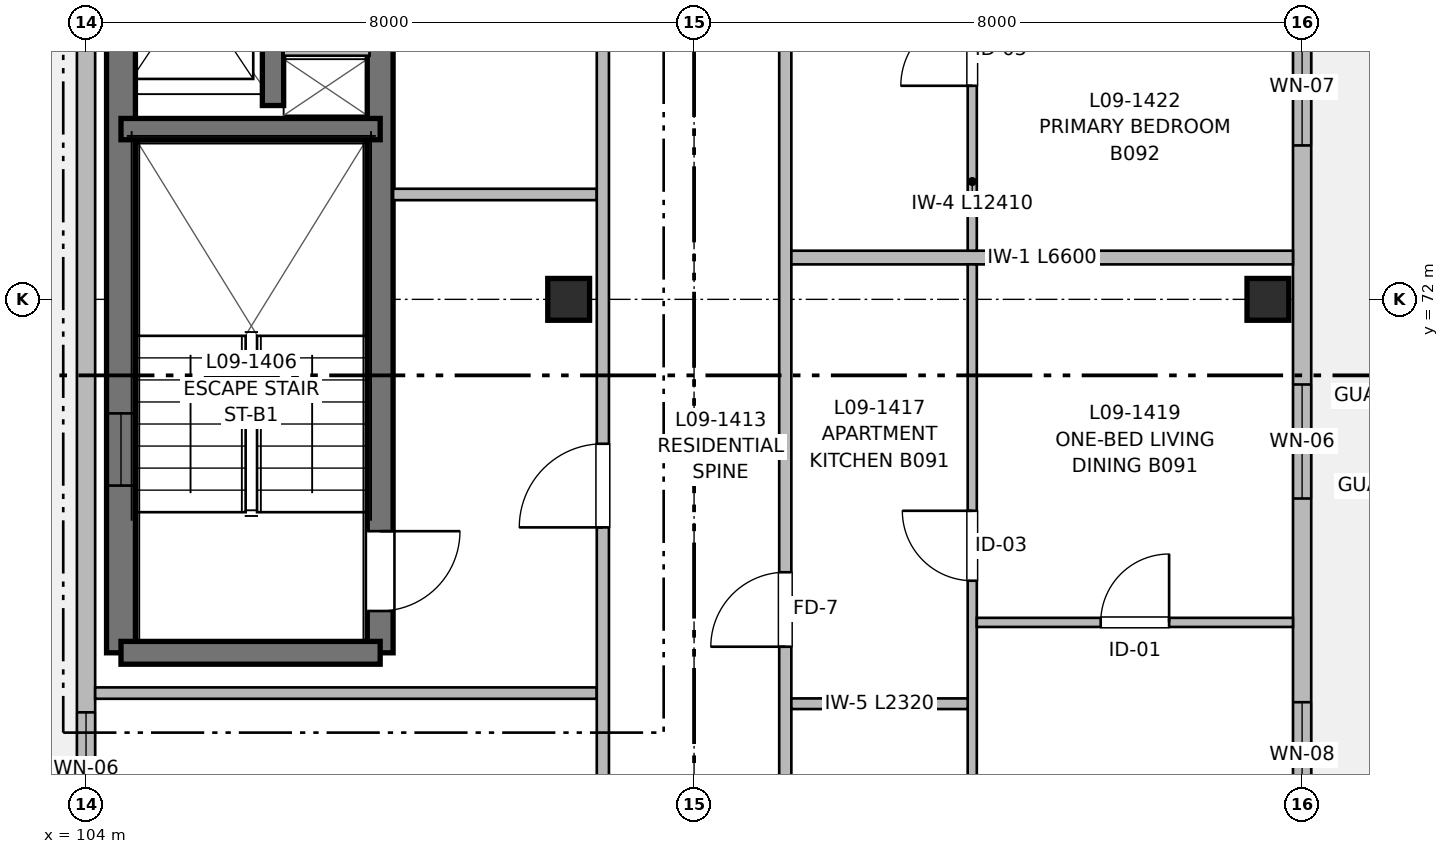
"""IFC4 building model, lengths in metres.
Left out: names, types, materials, properties, quantities, classifications, styles, units other than length and angle.
Written with IfcOpenShell. Run it as: python <this file> out.ifc"""

import sys

from ifc_helpers import new_model, si_unit, direction, frame, frame_2d, origin, origin_2d, place, context, subcontext, project, spatial, rectangle, extrude, element, fill, save


model = new_model("IFC4")
c1 = context("Model", 3, precision=1e-05, world=origin(), true_north=direction((0.0, 1.0)))
c2 = subcontext(c1, "Body", "Model", "MODEL_VIEW")
j1 = project(units=[si_unit("LENGTHUNIT", "METRE"), si_unit("PLANEANGLEUNIT", "RADIAN")], contexts=[c1])
p1 = place(None, origin())
s1 = spatial("IfcSite", under=j1, at=p1, CompositionType="ELEMENT")
p2 = place(p1, origin())
s2 = spatial("IfcBuilding", under=s1, at=p2, CompositionType="ELEMENT")
p3 = place(p2, frame((0.0, 0.0, 29.76)))
s3 = spatial("IfcBuildingStorey", under=s2, at=p3, CompositionType="ELEMENT", Elevation=29.76)
for number, where, z_axis, x_axis in (
    (1, (110.35, 72.0, 0.0), (0.0, 0.0, 1.0), (1.0, 0.0, 0.0)),
    (2, (119.55, 72.0, 0.0), (0.0, 0.0, 1.0), (1.0, 0.0, 0.0)),
):
    element("IfcColumn", number, at=place(p3, frame(where, z_axis=z_axis, x_axis=x_axis)), inside=s3, PredefinedType="COLUMN", context=c2, shape_type="SweptSolid", body=[
        extrude(rectangle(XDim=0.55, YDim=0.55, at=origin_2d()), origin(), (0.0, 0.0, 1.0), 3.2),
    ])
p4 = place(p3, frame((104.46, 67.35, 0.0), z_axis=(0.0, 0.0, 1.0), x_axis=(0.0, 1.0, 0.0)))
e3 = element("IfcWall", 3, at=p4, inside=s3, PredefinedType="SHEAR", context=c2, shape_type="SweptSolid", body=[
    extrude(rectangle(XDim=12.45, YDim=0.38, at=frame_2d((6.225, 0.0))), origin(), (0.0, 0.0, 1.0), 3.2),
])
p5 = place(p4, frame((2.2, 0.0, 0.97)))
e4 = element("IfcOpeningElement", 4, at=p5, cuts=e3, PredefinedType="OPENING", context=c2, shape_type="SweptSolid", body=[
    extrude(rectangle(XDim=0.95, YDim=1.25, at=frame_2d((0.475, 0.625))), frame((0.0, 0.2, 0.0), z_axis=(0.0, -1.0, 0.0), x_axis=(1.0, 0.0, 0.0)), (0.0, 0.0, 1.0), 0.4),
])
p6 = place(p3, frame((107.87, 79.8, 0.0), z_axis=(0.0, 0.0, 1.0), x_axis=(0.0, -1.0, 0.0)))
e5 = element("IfcWall", 5, at=p6, inside=s3, PredefinedType="SHEAR", context=c2, shape_type="SweptSolid", body=[
    extrude(rectangle(XDim=12.45, YDim=0.34, at=frame_2d((6.225, 0.0))), origin(), (0.0, 0.0, 1.0), 3.2),
])
p7 = place(p6, frame((10.85, 0.0, 0.0)))
e6 = element("IfcOpeningElement", 6, at=p7, cuts=e5, PredefinedType="OPENING", context=c2, shape_type="SweptSolid", body=[
    extrude(rectangle(XDim=1.05, YDim=2.15, at=frame_2d((0.525, 1.075))), frame((0.0, 0.18, 0.0), z_axis=(0.0, -1.0, 0.0), x_axis=(1.0, 0.0, 0.0)), (0.0, 0.0, 1.0), 0.36),
])
p8 = place(p3, frame((107.87, 67.35, 0.0), z_axis=(0.0, 0.0, 1.0), x_axis=(-1.0, 0.0, 0.0)))
e7 = element("IfcWall", 7, at=p8, inside=s3, PredefinedType="SHEAR", context=c2, shape_type="SweptSolid", body=[
    extrude(rectangle(XDim=3.41, YDim=0.3, at=frame_2d((1.705, 0.0))), origin(), (0.0, 0.0, 1.0), 3.2),
])
p9 = place(p3, frame((104.46, 74.24, 0.0), z_axis=(0.0, 0.0, 1.0), x_axis=(1.0, 0.0, 0.0)))
e8 = element("IfcWall", 8, at=p9, inside=s3, PredefinedType="SHEAR", context=c2, shape_type="SweptSolid", body=[
    extrude(rectangle(XDim=3.41, YDim=0.28, at=frame_2d((1.705, 0.0))), origin(), (0.0, 0.0, 1.0), 3.2),
])
p10 = place(p3, frame((106.46, 74.55, 0.0), z_axis=(0.0, 0.0, 1.0), x_axis=(0.0, 1.0, 0.0)))
e9 = element("IfcWall", 9, at=p10, inside=s3, PredefinedType="SHEAR", context=c2, shape_type="SweptSolid", body=[
    extrude(rectangle(XDim=5.25, YDim=0.28, at=frame_2d((2.625, 0.0))), origin(), (0.0, 0.0, 1.0), 3.2),
])
p11 = place(p10, frame((1.15, 0.0, 0.0)))
e10 = element("IfcOpeningElement", 10, at=p11, cuts=e9, PredefinedType="OPENING", context=c2, shape_type="SweptSolid", body=[
    extrude(rectangle(XDim=1.0, YDim=2.15, at=frame_2d((0.5, 1.075))), frame((0.0, 0.15, 0.0), z_axis=(0.0, -1.0, 0.0), x_axis=(1.0, 0.0, 0.0)), (0.0, 0.0, 1.0), 0.3),
])
p12 = place(p10, frame((3.85, 0.0, 0.0)))
e11 = element("IfcOpeningElement", 11, at=p12, cuts=e9, PredefinedType="OPENING", context=c2, shape_type="SweptSolid", body=[
    extrude(rectangle(XDim=0.9, YDim=2.15, at=frame_2d((0.45, 1.075))), frame((0.0, 0.15, 0.0), z_axis=(0.0, -1.0, 0.0), x_axis=(1.0, 0.0, 0.0)), (0.0, 0.0, 1.0), 0.3),
])
p13 = place(p3, frame((106.6, 75.28, 0.0), z_axis=(0.0, 0.0, 1.0), x_axis=(1.0, 0.0, 0.0)))
e12 = element("IfcWall", 12, at=p13, inside=s3, PredefinedType="PARTITIONING", context=c2, shape_type="SweptSolid", body=[
    extrude(rectangle(XDim=1.13, YDim=0.15, at=frame_2d((0.565, 0.0))), origin(), (0.0, 0.0, 1.0), 2.95),
])
p14 = place(p3, frame((120.0, 88.0, 0.0), z_axis=(0.0, 0.0, 1.0), x_axis=(0.0, -1.0, 0.0)))
e13 = element("IfcWall", 13, at=p14, inside=s3, PredefinedType="SOLIDWALL", context=c2, shape_type="SweptSolid", body=[
    extrude(rectangle(XDim=26.4, YDim=0.24, at=frame_2d((13.2, 0.0))), origin(), (0.0, 0.0, 1.0), 2.98),
])
p15 = place(p14, frame((3.8, 0.0, 0.0)))
e14 = element("IfcOpeningElement", 14, at=p15, cuts=e13, PredefinedType="OPENING", context=c2, shape_type="SweptSolid", body=[
    extrude(rectangle(XDim=1.2, YDim=2.2, at=frame_2d((0.6, 1.1))), frame((0.0, 0.13, 0.0), z_axis=(0.0, -1.0, 0.0), x_axis=(1.0, 0.0, 0.0)), (0.0, 0.0, 1.0), 0.26),
])
p16 = place(p14, frame((8.7, 0.0, 0.57)))
e15 = element("IfcOpeningElement", 15, at=p16, cuts=e13, PredefinedType="OPENING", context=c2, shape_type="SweptSolid", body=[
    extrude(rectangle(XDim=2.3, YDim=1.65, at=frame_2d((1.15, 0.825))), frame((0.0, 0.13, 0.0), z_axis=(0.0, -1.0, 0.0), x_axis=(1.0, 0.0, 0.0)), (0.0, 0.0, 1.0), 0.26),
])
p17 = place(p14, frame((12.425, 0.0, 0.82)))
e16 = element("IfcOpeningElement", 16, at=p17, cuts=e13, PredefinedType="OPENING", context=c2, shape_type="SweptSolid", body=[
    extrude(rectangle(XDim=1.55, YDim=1.4, at=frame_2d((0.775, 0.7))), frame((0.0, 0.13, 0.0), z_axis=(0.0, -1.0, 0.0), x_axis=(1.0, 0.0, 0.0)), (0.0, 0.0, 1.0), 0.26),
])
p18 = place(p14, frame((21.3, 0.0, 0.87)))
e17 = element("IfcOpeningElement", 17, at=p18, cuts=e13, PredefinedType="OPENING", context=c2, shape_type="SweptSolid", body=[
    extrude(rectangle(XDim=1.4, YDim=1.35, at=frame_2d((0.7, 0.675))), frame((0.0, 0.13, 0.0), z_axis=(0.0, -1.0, 0.0), x_axis=(1.0, 0.0, 0.0)), (0.0, 0.0, 1.0), 0.26),
])
p19 = place(p14, frame((17.12, 0.0, 0.82)))
e18 = element("IfcOpeningElement", 18, at=p19, cuts=e13, PredefinedType="OPENING", context=c2, shape_type="SweptSolid", body=[
    extrude(rectangle(XDim=1.5, YDim=1.4, at=frame_2d((0.75, 0.7))), frame((0.0, 0.13, 0.0), z_axis=(0.0, -1.0, 0.0), x_axis=(1.0, 0.0, 0.0)), (0.0, 0.0, 1.0), 0.26),
])
p20 = place(p14, frame((0.725, 0.0, 0.82)))
e19 = element("IfcOpeningElement", 19, at=p20, cuts=e13, PredefinedType="OPENING", context=c2, shape_type="SweptSolid", body=[
    extrude(rectangle(XDim=1.5, YDim=1.4, at=frame_2d((0.75, 0.7))), frame((0.0, 0.13, 0.0), z_axis=(0.0, -1.0, 0.0), x_axis=(1.0, 0.0, 0.0)), (0.0, 0.0, 1.0), 0.26),
])
p21 = place(p3, frame((104.0, 61.6, 0.0), z_axis=(0.0, 0.0, 1.0), x_axis=(0.0, 1.0, 0.0)))
e20 = element("IfcWall", 20, at=p21, inside=s3, PredefinedType="SOLIDWALL", context=c2, shape_type="SweptSolid", body=[
    extrude(rectangle(XDim=30.4, YDim=0.24, at=frame_2d((15.2, 0.0))), origin(), (0.0, 0.0, 1.0), 2.98),
])
p22 = place(p21, frame((3.467, 0.0, 0.82)))
e21 = element("IfcOpeningElement", 21, at=p22, cuts=e20, PredefinedType="OPENING", context=c2, shape_type="SweptSolid", body=[
    extrude(rectangle(XDim=1.5, YDim=1.4, at=frame_2d((0.75, 0.7))), frame((0.0, 0.13, 0.0), z_axis=(0.0, -1.0, 0.0), x_axis=(1.0, 0.0, 0.0)), (0.0, 0.0, 1.0), 0.26),
])
p23 = place(p21, frame((14.425, 0.0, 0.82)))
e22 = element("IfcOpeningElement", 22, at=p23, cuts=e20, PredefinedType="OPENING", context=c2, shape_type="SweptSolid", body=[
    extrude(rectangle(XDim=1.55, YDim=1.4, at=frame_2d((0.775, 0.7))), frame((0.0, 0.13, 0.0), z_axis=(0.0, -1.0, 0.0), x_axis=(1.0, 0.0, 0.0)), (0.0, 0.0, 1.0), 0.26),
])
p24 = place(p21, frame((24.333, 0.0, 0.0)))
e23 = element("IfcOpeningElement", 23, at=p24, cuts=e20, PredefinedType="OPENING", context=c2, shape_type="SweptSolid", body=[
    extrude(rectangle(XDim=1.2, YDim=2.2, at=frame_2d((0.6, 1.1))), frame((0.0, 0.13, 0.0), z_axis=(0.0, -1.0, 0.0), x_axis=(1.0, 0.0, 0.0)), (0.0, 0.0, 1.0), 0.26),
])
p25 = place(p21, frame((26.633, 0.0, 0.72)))
e24 = element("IfcOpeningElement", 24, at=p25, cuts=e20, PredefinedType="OPENING", context=c2, shape_type="SweptSolid", body=[
    extrude(rectangle(XDim=1.95, YDim=1.5, at=frame_2d((0.975, 0.75))), frame((0.0, 0.13, 0.0), z_axis=(0.0, -1.0, 0.0), x_axis=(1.0, 0.0, 0.0)), (0.0, 0.0, 1.0), 0.26),
])
p26 = place(p3, frame((104.12, 66.82, 0.0), z_axis=(0.0, 0.0, 1.0), x_axis=(1.0, 0.0, 0.0)))
e25 = element("IfcWall", 25, at=p26, inside=s3, PredefinedType="PARTITIONING", context=c2, shape_type="SweptSolid", body=[
    extrude(rectangle(XDim=6.6, YDim=0.15, at=frame_2d((3.3, 0.0))), origin(), (0.0, 0.0, 1.0), 2.935),
])
p27 = place(p3, frame((108.04, 73.38, 0.0), z_axis=(0.0, 0.0, 1.0), x_axis=(1.0, 0.0, 0.0)))
e26 = element("IfcWall", 26, at=p27, inside=s3, PredefinedType="PARTITIONING", context=c2, shape_type="SweptSolid", body=[
    extrude(rectangle(XDim=2.68, YDim=0.15, at=frame_2d((1.34, 0.0))), origin(), (0.0, 0.0, 1.0), 2.935),
])
p28 = place(p3, frame((110.8, 61.76, 0.0), z_axis=(0.0, 0.0, 1.0), x_axis=(0.0, 1.0, 0.0)))
e27 = element("IfcWall", 27, at=p28, inside=s3, PredefinedType="PARTITIONING", context=c2, shape_type="SweptSolid", body=[
    extrude(rectangle(XDim=45.04, YDim=0.16, at=frame_2d((22.52, 0.0))), origin(), (0.0, 0.0, 1.0), 2.935),
])
p29 = place(p28, frame((7.24, 0.0, 0.0)))
e28 = element("IfcOpeningElement", 28, at=p29, cuts=e27, PredefinedType="OPENING", context=c2, shape_type="SweptSolid", body=[
    extrude(rectangle(XDim=1.1, YDim=2.15, at=frame_2d((0.55, 1.075))), frame((0.0, 0.09, 0.0), z_axis=(0.0, -1.0, 0.0), x_axis=(1.0, 0.0, 0.0)), (0.0, 0.0, 1.0), 0.18),
])
p30 = place(p28, frame((13.64, 0.0, 0.0)))
e29 = element("IfcOpeningElement", 29, at=p30, cuts=e27, PredefinedType="OPENING", context=c2, shape_type="SweptSolid", body=[
    extrude(rectangle(XDim=1.6, YDim=2.15, at=frame_2d((0.8, 1.075))), frame((0.0, 0.09, 0.0), z_axis=(0.0, -1.0, 0.0), x_axis=(1.0, 0.0, 0.0)), (0.0, 0.0, 1.0), 0.18),
])
p31 = place(p28, frame((3.0, 0.0, 0.0)))
e30 = element("IfcOpeningElement", 30, at=p31, cuts=e27, PredefinedType="OPENING", context=c2, shape_type="SweptSolid", body=[
    extrude(rectangle(XDim=0.96, YDim=2.15, at=frame_2d((0.48, 1.075))), frame((0.0, 0.09, 0.0), z_axis=(0.0, -1.0, 0.0), x_axis=(1.0, 0.0, 0.0)), (0.0, 0.0, 1.0), 0.18),
])
p32 = place(p28, frame((27.245, 0.0, 0.0)))
e31 = element("IfcOpeningElement", 31, at=p32, cuts=e27, PredefinedType="OPENING", context=c2, shape_type="SweptSolid", body=[
    extrude(rectangle(XDim=0.98, YDim=2.15, at=frame_2d((0.49, 1.075))), frame((0.0, 0.09, 0.0), z_axis=(0.0, -1.0, 0.0), x_axis=(1.0, 0.0, 0.0)), (0.0, 0.0, 1.0), 0.18),
])
p33 = place(p28, frame((35.055, 0.0, 0.0)))
e32 = element("IfcOpeningElement", 32, at=p33, cuts=e27, PredefinedType="OPENING", context=c2, shape_type="SweptSolid", body=[
    extrude(rectangle(XDim=0.98, YDim=2.15, at=frame_2d((0.49, 1.075))), frame((0.0, 0.09, 0.0), z_axis=(0.0, -1.0, 0.0), x_axis=(1.0, 0.0, 0.0)), (0.0, 0.0, 1.0), 0.18),
])
p34 = place(p3, frame((113.2, 61.76, 0.0), z_axis=(0.0, 0.0, 1.0), x_axis=(0.0, 1.0, 0.0)))
e33 = element("IfcWall", 33, at=p34, inside=s3, PredefinedType="PARTITIONING", context=c2, shape_type="SweptSolid", body=[
    extrude(rectangle(XDim=45.04, YDim=0.16, at=frame_2d((22.52, 0.0))), origin(), (0.0, 0.0, 1.0), 2.935),
])
p35 = place(p34, frame((5.67, 0.0, 0.0)))
e34 = element("IfcOpeningElement", 34, at=p35, cuts=e33, PredefinedType="OPENING", context=c2, shape_type="SweptSolid", body=[
    extrude(rectangle(XDim=0.98, YDim=2.15, at=frame_2d((0.49, 1.075))), frame((0.0, 0.09, 0.0), z_axis=(0.0, -1.0, 0.0), x_axis=(1.0, 0.0, 0.0)), (0.0, 0.0, 1.0), 0.18),
])
p36 = place(p34, frame((17.34, 0.0, 0.0)))
e35 = element("IfcOpeningElement", 35, at=p36, cuts=e33, PredefinedType="OPENING", context=c2, shape_type="SweptSolid", body=[
    extrude(rectangle(XDim=1.02, YDim=2.15, at=frame_2d((0.51, 1.075))), frame((0.0, 0.09, 0.0), z_axis=(0.0, -1.0, 0.0), x_axis=(1.0, 0.0, 0.0)), (0.0, 0.0, 1.0), 0.18),
])
p37 = place(p34, frame((29.51, 0.0, 0.0)))
e36 = element("IfcOpeningElement", 36, at=p37, cuts=e33, PredefinedType="OPENING", context=c2, shape_type="SweptSolid", body=[
    extrude(rectangle(XDim=0.98, YDim=2.15, at=frame_2d((0.49, 1.075))), frame((0.0, 0.09, 0.0), z_axis=(0.0, -1.0, 0.0), x_axis=(1.0, 0.0, 0.0)), (0.0, 0.0, 1.0), 0.18),
])
p38 = place(p34, frame((40.42, 0.0, 0.0)))
e37 = element("IfcOpeningElement", 37, at=p38, cuts=e33, PredefinedType="OPENING", context=c2, shape_type="SweptSolid", body=[
    extrude(rectangle(XDim=0.98, YDim=2.15, at=frame_2d((0.49, 1.075))), frame((0.0, 0.09, 0.0), z_axis=(0.0, -1.0, 0.0), x_axis=(1.0, 0.0, 0.0)), (0.0, 0.0, 1.0), 0.18),
])
p39 = place(p3, frame((113.28, 72.55, 0.0), z_axis=(0.0, 0.0, 1.0), x_axis=(1.0, 0.0, 0.0)))
e38 = element("IfcWall", 38, at=p39, inside=s3, PredefinedType="PARTITIONING", context=c2, shape_type="SweptSolid", body=[
    extrude(rectangle(XDim=6.6, YDim=0.18, at=frame_2d((3.3, 0.0))), origin(), (0.0, 0.0, 1.0), 2.935),
])
p40 = place(p3, frame((115.66, 61.76, 0.0), z_axis=(0.0, 0.0, 1.0), x_axis=(0.0, 1.0, 0.0)))
e39 = element("IfcWall", 39, at=p40, inside=s3, PredefinedType="PARTITIONING", context=c2, shape_type="SweptSolid", body=[
    extrude(rectangle(XDim=10.7, YDim=0.12, at=frame_2d((5.35, 0.0))), origin(), (0.0, 0.0, 1.0), 2.935),
])
p41 = place(p40, frame((1.87, 0.0, 0.0)))
e40 = element("IfcOpeningElement", 40, at=p41, cuts=e39, PredefinedType="OPENING", context=c2, shape_type="SweptSolid", body=[
    extrude(rectangle(XDim=0.86, YDim=2.1, at=frame_2d((0.43, 1.05))), frame((0.0, 0.07, 0.0), z_axis=(0.0, -1.0, 0.0), x_axis=(1.0, 0.0, 0.0)), (0.0, 0.0, 1.0), 0.14),
])
p42 = place(p40, frame((6.538, 0.0, 0.0)))
e41 = element("IfcOpeningElement", 41, at=p42, cuts=e39, PredefinedType="OPENING", context=c2, shape_type="SweptSolid", body=[
    extrude(rectangle(XDim=0.92, YDim=2.1, at=frame_2d((0.46, 1.05))), frame((0.0, 0.07, 0.0), z_axis=(0.0, -1.0, 0.0), x_axis=(1.0, 0.0, 0.0)), (0.0, 0.0, 1.0), 0.14),
])
p43 = place(p3, frame((113.28, 66.68, 0.0), z_axis=(0.0, 0.0, 1.0), x_axis=(1.0, 0.0, 0.0)))
e42 = element("IfcWall", 42, at=p43, inside=s3, PredefinedType="PARTITIONING", context=c2, shape_type="SweptSolid", body=[
    extrude(rectangle(XDim=2.32, YDim=0.14, at=frame_2d((1.16, 0.0))), origin(), (0.0, 0.0, 1.0), 2.935),
])
p44 = place(p3, frame((115.72, 67.75, 0.0), z_axis=(0.0, 0.0, 1.0), x_axis=(1.0, 0.0, 0.0)))
e43 = element("IfcWall", 43, at=p44, inside=s3, PredefinedType="PARTITIONING", context=c2, shape_type="SweptSolid", body=[
    extrude(rectangle(XDim=4.16, YDim=0.12, at=frame_2d((2.08, 0.0))), origin(), (0.0, 0.0, 1.0), 2.935),
])
p45 = place(p44, frame((1.63, 0.0, 0.0)))
e44 = element("IfcOpeningElement", 44, at=p45, cuts=e43, PredefinedType="OPENING", context=c2, shape_type="SweptSolid", body=[
    extrude(rectangle(XDim=0.9, YDim=2.1, at=frame_2d((0.45, 1.05))), frame((0.0, 0.07, 0.0), z_axis=(0.0, -1.0, 0.0), x_axis=(1.0, 0.0, 0.0)), (0.0, 0.0, 1.0), 0.14),
])
p46 = place(p3, frame((115.66, 72.64, 0.0), z_axis=(0.0, 0.0, 1.0), x_axis=(0.0, 1.0, 0.0)))
e45 = element("IfcWall", 45, at=p46, inside=s3, PredefinedType="PARTITIONING", context=c2, shape_type="SweptSolid", body=[
    extrude(rectangle(XDim=12.41, YDim=0.12, at=frame_2d((6.205, 0.0))), origin(), (0.0, 0.0, 1.0), 2.935),
])
p47 = place(p46, frame((2.17, 0.0, 0.0)))
e46 = element("IfcOpeningElement", 46, at=p47, cuts=e45, PredefinedType="OPENING", context=c2, shape_type="SweptSolid", body=[
    extrude(rectangle(XDim=0.94, YDim=2.1, at=frame_2d((0.47, 1.05))), frame((0.0, 0.07, 0.0), z_axis=(0.0, -1.0, 0.0), x_axis=(1.0, 0.0, 0.0)), (0.0, 0.0, 1.0), 0.14),
])
p48 = place(p46, frame((7.586, 0.0, 0.0)))
e47 = element("IfcOpeningElement", 47, at=p48, cuts=e45, PredefinedType="OPENING", context=c2, shape_type="SweptSolid", body=[
    extrude(rectangle(XDim=0.92, YDim=2.1, at=frame_2d((0.46, 1.05))), frame((0.0, 0.07, 0.0), z_axis=(0.0, -1.0, 0.0), x_axis=(1.0, 0.0, 0.0)), (0.0, 0.0, 1.0), 0.14),
])
p49 = place(p7, origin())
e48 = element("IfcDoor", 48, at=p49, inside=s3, OperationType="SINGLE_SWING_LEFT", PredefinedType="DOOR", context=c2, shape_type="SweptSolid", body=[
    extrude(rectangle(XDim=1.05, YDim=2.15, at=frame_2d((0.525, 1.075))), frame((0.0, 0.025, 0.0), z_axis=(0.0, -1.0, 0.0), x_axis=(1.0, 0.0, 0.0)), (0.0, 0.0, 1.0), 0.05),
])
fill(e6, e48)
p50 = place(p5, origin())
e49 = element("IfcWindow", 49, at=p50, inside=s3, PartitioningType="SINGLE_PANEL", PredefinedType="WINDOW", context=c2, shape_type="SweptSolid", body=[
    extrude(rectangle(XDim=0.95, YDim=1.25, at=frame_2d((0.475, 0.625))), frame((0.0, 0.03, 0.0), z_axis=(0.0, -1.0, 0.0), x_axis=(1.0, 0.0, 0.0)), (0.0, 0.0, 1.0), 0.06),
])
fill(e4, e49)
p51 = place(p17, origin())
e50 = element("IfcWindow", 50, at=p51, inside=s3, PartitioningType="SINGLE_PANEL", PredefinedType="WINDOW", context=c2, shape_type="SweptSolid", body=[
    extrude(rectangle(XDim=1.55, YDim=1.4, at=frame_2d((0.775, 0.7))), frame((0.0, 0.03, 0.0), z_axis=(0.0, -1.0, 0.0), x_axis=(1.0, 0.0, 0.0)), (0.0, 0.0, 1.0), 0.06),
])
fill(e16, e50)
p52 = place(p18, origin())
e51 = element("IfcWindow", 51, at=p52, inside=s3, PartitioningType="SINGLE_PANEL", PredefinedType="WINDOW", context=c2, shape_type="SweptSolid", body=[
    extrude(rectangle(XDim=1.4, YDim=1.35, at=frame_2d((0.7, 0.675))), frame((0.0, 0.03, 0.0), z_axis=(0.0, -1.0, 0.0), x_axis=(1.0, 0.0, 0.0)), (0.0, 0.0, 1.0), 0.06),
])
fill(e17, e51)
p53 = place(p22, origin())
e52 = element("IfcWindow", 52, at=p53, inside=s3, PartitioningType="SINGLE_PANEL", PredefinedType="WINDOW", context=c2, shape_type="SweptSolid", body=[
    extrude(rectangle(XDim=1.5, YDim=1.4, at=frame_2d((0.75, 0.7))), frame((0.0, 0.03, 0.0), z_axis=(0.0, -1.0, 0.0), x_axis=(1.0, 0.0, 0.0)), (0.0, 0.0, 1.0), 0.06),
])
fill(e21, e52)
p54 = place(p29, origin())
e53 = element("IfcDoor", 53, at=p54, inside=s3, OperationType="SINGLE_SWING_LEFT", PredefinedType="DOOR", context=c2, shape_type="SweptSolid", body=[
    extrude(rectangle(XDim=1.1, YDim=2.15, at=frame_2d((0.55, 1.075))), frame((0.0, 0.025, 0.0), z_axis=(0.0, -1.0, 0.0), x_axis=(1.0, 0.0, 0.0)), (0.0, 0.0, 1.0), 0.05),
])
fill(e28, e53)
p55 = place(p42, origin())
e54 = element("IfcDoor", 54, at=p55, inside=s3, OperationType="SINGLE_SWING_RIGHT", PredefinedType="DOOR", context=c2, shape_type="SweptSolid", body=[
    extrude(rectangle(XDim=0.92, YDim=2.1, at=frame_2d((0.46, 1.05))), frame((0.0, 0.025, 0.0), z_axis=(0.0, -1.0, 0.0), x_axis=(1.0, 0.0, 0.0)), (0.0, 0.0, 1.0), 0.05),
])
fill(e41, e54)
p56 = place(p35, origin())
e55 = element("IfcDoor", 55, at=p56, inside=s3, OperationType="SINGLE_SWING_LEFT", PredefinedType="DOOR", context=c2, shape_type="SweptSolid", body=[
    extrude(rectangle(XDim=0.98, YDim=2.15, at=frame_2d((0.49, 1.075))), frame((0.0, 0.025, 0.0), z_axis=(0.0, -1.0, 0.0), x_axis=(1.0, 0.0, 0.0)), (0.0, 0.0, 1.0), 0.05),
])
fill(e34, e55)
p57 = place(p45, origin())
e56 = element("IfcDoor", 56, at=p57, inside=s3, OperationType="SINGLE_SWING_RIGHT", PredefinedType="DOOR", context=c2, shape_type="SweptSolid", body=[
    extrude(rectangle(XDim=0.9, YDim=2.1, at=frame_2d((0.45, 1.05))), frame((0.0, 0.025, 0.0), z_axis=(0.0, -1.0, 0.0), x_axis=(1.0, 0.0, 0.0)), (0.0, 0.0, 1.0), 0.05),
])
fill(e44, e56)
p58 = place(p47, origin())
e57 = element("IfcDoor", 57, at=p58, inside=s3, OperationType="SINGLE_SWING_LEFT", PredefinedType="DOOR", context=c2, shape_type="SweptSolid", body=[
    extrude(rectangle(XDim=0.94, YDim=2.1, at=frame_2d((0.47, 1.05))), frame((0.0, 0.025, 0.0), z_axis=(0.0, -1.0, 0.0), x_axis=(1.0, 0.0, 0.0)), (0.0, 0.0, 1.0), 0.05),
])
fill(e46, e57)
p59 = place(p19, origin())
e58 = element("IfcWindow", 58, at=p59, inside=s3, PartitioningType="SINGLE_PANEL", PredefinedType="WINDOW", context=c2, shape_type="SweptSolid", body=[
    extrude(rectangle(XDim=1.5, YDim=1.4, at=frame_2d((0.75, 0.7))), frame((0.0, 0.03, 0.0), z_axis=(0.0, -1.0, 0.0), x_axis=(1.0, 0.0, 0.0)), (0.0, 0.0, 1.0), 0.06),
])
fill(e18, e58)
save(model, sys.argv[1])
